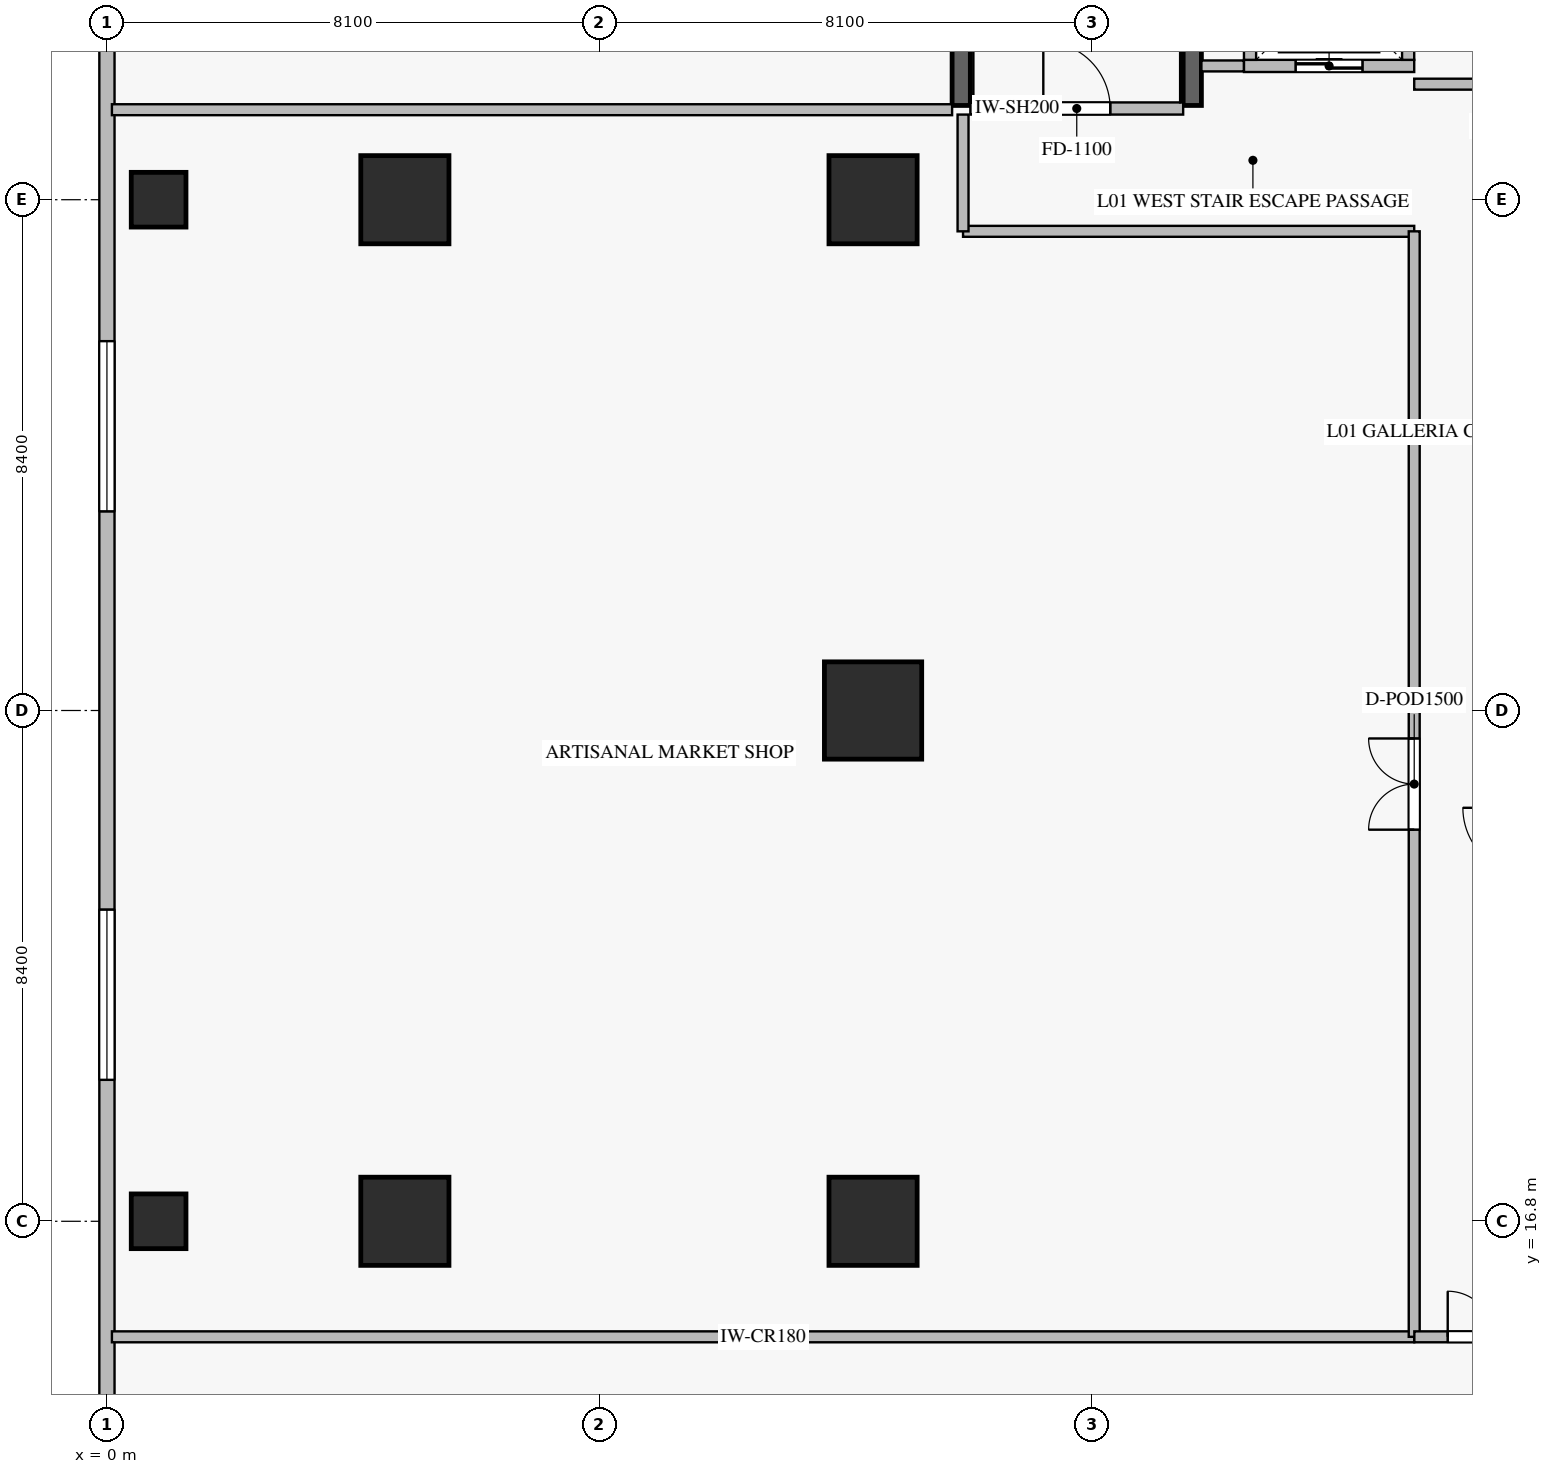
"""IFC4 building model, lengths in metres.
Left out: names, types, materials, properties, quantities, classifications, styles, units other than length and angle.
Written with IfcOpenShell. Run it as: python <this file> out.ifc"""

import sys

from ifc_helpers import new_model, si_unit, direction, frame, frame_2d, origin, origin_2d, place, context, subcontext, project, spatial, rectangle, extrude, source, transform, mapped, element, fill, save


model = new_model("IFC4")
c1 = context("Model", 3, precision=1e-05, world=origin(), true_north=direction((0.0, 1.0)))
c2 = subcontext(c1, "Body", "Model", "MODEL_VIEW")
j1 = project(units=[si_unit("LENGTHUNIT", "METRE"), si_unit("PLANEANGLEUNIT", "RADIAN")], contexts=[c1])
p1 = place(None, origin())
s1 = spatial("IfcSite", under=j1, at=p1, CompositionType="ELEMENT")
p2 = place(p1, origin())
s2 = spatial("IfcBuilding", under=s1, at=p2, CompositionType="ELEMENT")
p3 = place(p2, frame((0.0, 0.0, 5.5)))
s3 = spatial("IfcBuildingStorey", under=s2, at=p3, CompositionType="ELEMENT", Elevation=5.5)
m1 = source(origin(), c2, "Body", "SweptSolid", [
    extrude(rectangle(XDim=0.9, YDim=0.9, at=origin_2d()), origin(), (0.0, 0.0, 1.0), 5.0),
])
for number, where, z_axis, x_axis in (
    (1, (0.85, 16.8, -0.38), (0.0, 0.0, 1.0), (1.0, 0.0, 0.0)),
    (2, (0.85, 33.6, -0.38), (0.0, 0.0, 1.0), (1.0, 0.0, 0.0)),
):
    element("IfcColumn", number, at=place(p3, frame(where, z_axis=z_axis, x_axis=x_axis)), inside=s3, PredefinedType="COLUMN", context=c2, shape_type="MappedRepresentation", body=[
        mapped(m1, transform((0.0, 0.0, 0.0), scale=1.0)),
    ])
m2 = source(origin(), c2, "Body", "SweptSolid", [
    extrude(rectangle(XDim=1.45, YDim=1.45, at=origin_2d()), origin(), (0.0, 0.0, 1.0), 5.0),
])
p4 = place(p3, frame((12.6, 16.8, -0.38), z_axis=(0.0, 0.0, 1.0), x_axis=(1.0, 0.0, 0.0)))
e3 = element("IfcColumn", 3, at=p4, inside=s3, PredefinedType="COLUMN", context=c2, shape_type="MappedRepresentation", body=[
    mapped(m2, transform((0.0, 0.0, 0.0), scale=1.0)),
])
m3 = source(origin(), c2, "Body", "SweptSolid", [
    extrude(rectangle(XDim=1.6, YDim=1.6, at=origin_2d()), origin(), (0.0, 0.0, 1.0), 5.0),
])
p5 = place(p3, frame((12.6, 25.2, -0.38), z_axis=(0.0, 0.0, 1.0), x_axis=(1.0, 0.0, 0.0)))
e4 = element("IfcColumn", 4, at=p5, inside=s3, PredefinedType="COLUMN", context=c2, shape_type="MappedRepresentation", body=[
    mapped(m3, transform((0.0, 0.0, 0.0), scale=1.0)),
])
for number, where, z_axis, x_axis in (
    (5, (12.6, 33.6, -0.38), (0.0, 0.0, 1.0), (1.0, 0.0, 0.0)),
    (6, (4.9, 16.8, -0.38), (0.0, 0.0, 1.0), (1.0, 0.0, 0.0)),
    (7, (4.9, 33.6, -0.38), (0.0, 0.0, 1.0), (1.0, 0.0, 0.0)),
):
    element("IfcColumn", number, at=place(p3, frame(where, z_axis=z_axis, x_axis=x_axis)), inside=s3, PredefinedType="COLUMN", context=c2, shape_type="MappedRepresentation", body=[
        mapped(m2, transform((0.0, 0.0, 0.0), scale=1.0)),
    ])
p6 = place(p3, frame((0.0, 46.075, 0.0), z_axis=(0.0, 0.0, 1.0), x_axis=(0.0, -1.0, 0.0)))
e8 = element("IfcWall", 8, at=p6, inside=s3, PredefinedType="ELEMENTEDWALL", context=c2, shape_type="SweptSolid", body=[
    extrude(rectangle(XDim=41.75, YDim=0.25, at=frame_2d((20.875, 0.0))), origin(), (0.0, 0.0, 1.0), 4.605),
])
p7 = place(p6, frame((14.801, 0.0, 0.6)))
e9 = element("IfcOpeningElement", 9, at=p7, cuts=e8, PredefinedType="OPENING", context=c2, shape_type="SweptSolid", body=[
    extrude(rectangle(XDim=2.8, YDim=3.0, at=frame_2d((1.4, 1.5))), frame((0.0, 0.135, 0.0), z_axis=(0.0, -1.0, 0.0), x_axis=(1.0, 0.0, 0.0)), (0.0, 0.0, 1.0), 0.27),
])
p8 = place(p6, frame((24.149, 0.0, 0.6)))
e10 = element("IfcOpeningElement", 10, at=p8, cuts=e8, PredefinedType="OPENING", context=c2, shape_type="SweptSolid", body=[
    extrude(rectangle(XDim=2.8, YDim=3.0, at=frame_2d((1.4, 1.5))), frame((0.0, 0.135, 0.0), z_axis=(0.0, -1.0, 0.0), x_axis=(1.0, 0.0, 0.0)), (0.0, 0.0, 1.0), 0.27),
])
for number, where, z_axis, x_axis in (
    (11, (14.05, 35.15, -0.38), (0.0, 0.0, 1.0), (0.0, 1.0, 0.0)),
    (12, (17.85, 35.15, -0.38), (0.0, 0.0, 1.0), (0.0, 1.0, 0.0)),
):
    element("IfcWall", number, at=place(p3, frame(where, z_axis=z_axis, x_axis=x_axis)), inside=s3, PredefinedType="SHEAR", context=c2, shape_type="SweptSolid", body=[
        extrude(rectangle(XDim=7.9, YDim=0.3, at=frame_2d((3.95, 0.0))), origin(), (0.0, 0.0, 1.0), 4.998),
    ])
p9 = place(p3, frame((14.2, 35.1, 0.0), z_axis=(0.0, 0.0, 1.0), x_axis=(1.0, 0.0, 0.0)))
e13 = element("IfcWall", 13, at=p9, inside=s3, PredefinedType="STANDARD", context=c2, shape_type="SweptSolid", body=[
    extrude(rectangle(XDim=3.5, YDim=0.2, at=frame_2d((1.75, 0.0))), origin(), (0.0, 0.0, 1.0), 4.62),
])
p10 = place(p9, frame((1.2, 0.0, 0.0)))
e14 = element("IfcOpeningElement", 14, at=p10, cuts=e13, PredefinedType="OPENING", context=c2, shape_type="SweptSolid", body=[
    extrude(rectangle(XDim=1.1, YDim=2.15, at=frame_2d((0.55, 1.075))), frame((0.0, 0.11, 0.0), z_axis=(0.0, -1.0, 0.0), x_axis=(1.0, 0.0, 0.0)), (0.0, 0.0, 1.0), 0.22),
])
p11 = place(p3, frame((18.7, 35.8, 0.0), z_axis=(0.0, 0.0, 1.0), x_axis=(1.0, 0.0, 0.0)))
e15 = element("IfcWall", 15, at=p11, inside=s3, PredefinedType="STANDARD", context=c2, shape_type="SweptSolid", body=[
    extrude(rectangle(XDim=2.8, YDim=0.2, at=frame_2d((1.4, 0.0))), origin(), (0.0, 0.0, 1.0), 4.62),
])
p12 = place(p11, frame((0.85, 0.0, 0.0)))
e16 = element("IfcOpeningElement", 16, at=p12, cuts=e15, PredefinedType="OPENING", context=c2, shape_type="SweptSolid", body=[
    extrude(rectangle(XDim=1.1, YDim=2.2, at=frame_2d((0.55, 1.1))), frame((0.0, 0.11, 0.0), z_axis=(0.0, -1.0, 0.0), x_axis=(1.0, 0.0, 0.0)), (0.0, 0.0, 1.0), 0.22),
])
for number, where, z_axis, x_axis in (
    (17, (18.8, 35.9, 0.0), (0.0, 0.0, 1.0), (0.0, 1.0, 0.0)),
    (18, (21.4, 35.9, 0.0), (0.0, 0.0, 1.0), (0.0, 1.0, 0.0)),
):
    element("IfcWall", number, at=place(p3, frame(where, z_axis=z_axis, x_axis=x_axis)), inside=s3, PredefinedType="STANDARD", context=c2, shape_type="SweptSolid", body=[
        extrude(rectangle(XDim=2.4, YDim=0.2, at=frame_2d((1.2, 0.0))), origin(), (0.0, 0.0, 1.0), 4.62),
    ])
p13 = place(p3, frame((0.082, 14.9, 0.0), z_axis=(0.0, 0.0, 1.0), x_axis=(1.0, 0.0, 0.0)))
e19 = element("IfcWall", 19, at=p13, inside=s3, PredefinedType="PARTITIONING", context=c2, shape_type="SweptSolid", body=[
    extrude(rectangle(XDim=21.418, YDim=0.18, at=frame_2d((10.709, 0.0))), origin(), (0.0, 0.0, 1.0), 4.62),
])
p14 = place(p3, frame((0.082, 35.08, 0.0), z_axis=(0.0, 0.0, 1.0), x_axis=(1.0, 0.0, 0.0)))
e20 = element("IfcWall", 20, at=p14, inside=s3, PredefinedType="PARTITIONING", context=c2, shape_type="SweptSolid", body=[
    extrude(rectangle(XDim=13.818, YDim=0.18, at=frame_2d((6.909, 0.0))), origin(), (0.0, 0.0, 1.0), 4.62),
])
p15 = place(p3, frame((14.08, 33.08, 0.0), z_axis=(0.0, 0.0, 1.0), x_axis=(1.0, 0.0, 0.0)))
e21 = element("IfcWall", 21, at=p15, inside=s3, PredefinedType="PARTITIONING", context=c2, shape_type="SweptSolid", body=[
    extrude(rectangle(XDim=7.42, YDim=0.18, at=frame_2d((3.71, 0.0))), origin(), (0.0, 0.0, 1.0), 4.62),
])
p16 = place(p3, frame((18.0, 35.8, 0.0), z_axis=(0.0, 0.0, 1.0), x_axis=(1.0, 0.0, 0.0)))
e22 = element("IfcWall", 22, at=p16, inside=s3, PredefinedType="PARTITIONING", context=c2, shape_type="SweptSolid", body=[
    extrude(rectangle(XDim=0.698, YDim=0.18, at=frame_2d((0.349, 0.0))), origin(), (0.0, 0.0, 1.0), 4.62),
])
p17 = place(p3, frame((14.08, 33.08, 0.0), z_axis=(0.0, 0.0, 1.0), x_axis=(0.0, 1.0, 0.0)))
e23 = element("IfcWall", 23, at=p17, inside=s3, PredefinedType="PARTITIONING", context=c2, shape_type="SweptSolid", body=[
    extrude(rectangle(XDim=1.92, YDim=0.18, at=frame_2d((0.96, 0.0))), origin(), (0.0, 0.0, 1.0), 4.62),
])
p18 = place(p3, frame((21.5, 14.9, 0.0), z_axis=(0.0, 0.0, 1.0), x_axis=(0.0, 1.0, 0.0)))
e24 = element("IfcWall", 24, at=p18, inside=s3, PredefinedType="PARTITIONING", context=c2, shape_type="SweptSolid", body=[
    extrude(rectangle(XDim=18.18, YDim=0.18, at=frame_2d((9.09, 0.0))), origin(), (0.0, 0.0, 1.0), 4.62),
])
p19 = place(p18, frame((8.34, 0.0, 0.0)))
e25 = element("IfcOpeningElement", 25, at=p19, cuts=e24, PredefinedType="OPENING", context=c2, shape_type="SweptSolid", body=[
    extrude(rectangle(XDim=1.5, YDim=2.25, at=frame_2d((0.75, 1.125))), frame((0.0, 0.1, 0.0), z_axis=(0.0, -1.0, 0.0), x_axis=(1.0, 0.0, 0.0)), (0.0, 0.0, 1.0), 0.2),
])
p20 = place(p3, frame((21.502, 14.9, 0.0), z_axis=(0.0, 0.0, 1.0), x_axis=(1.0, 0.0, 0.0)))
e26 = element("IfcWall", 26, at=p20, inside=s3, PredefinedType="PARTITIONING", context=c2, shape_type="SweptSolid", body=[
    extrude(rectangle(XDim=2.598, YDim=0.18, at=frame_2d((1.299, 0.0))), origin(), (0.0, 0.0, 1.0), 4.62),
])
p21 = place(p20, frame((0.549, 0.0, 0.0)))
e27 = element("IfcOpeningElement", 27, at=p21, cuts=e26, PredefinedType="OPENING", context=c2, shape_type="SweptSolid", body=[
    extrude(rectangle(XDim=1.5, YDim=2.25, at=frame_2d((0.75, 1.125))), frame((0.0, 0.1, 0.0), z_axis=(0.0, -1.0, 0.0), x_axis=(1.0, 0.0, 0.0)), (0.0, 0.0, 1.0), 0.2),
])
p22 = place(p3, frame((21.5, 35.5, 0.0), z_axis=(0.0, 0.0, 1.0), x_axis=(1.0, 0.0, 0.0)))
e28 = element("IfcWall", 28, at=p22, inside=s3, PredefinedType="PARTITIONING", context=c2, shape_type="SweptSolid", body=[
    extrude(rectangle(XDim=3.5, YDim=0.18, at=frame_2d((1.75, 0.0))), origin(), (0.0, 0.0, 1.0), 4.62),
])
p23 = place(p22, frame((1.05, 0.0, 0.0)))
e29 = element("IfcOpeningElement", 29, at=p23, cuts=e28, PredefinedType="OPENING", context=c2, shape_type="SweptSolid", body=[
    extrude(rectangle(XDim=1.4, YDim=2.25, at=frame_2d((0.7, 1.125))), frame((0.0, 0.1, 0.0), z_axis=(0.0, -1.0, 0.0), x_axis=(1.0, 0.0, 0.0)), (0.0, 0.0, 1.0), 0.2),
])
m4 = source(origin(), c2, "Body", "SweptSolid", [
    extrude(rectangle(XDim=2.8, YDim=3.0, at=frame_2d((1.4, 1.5))), frame((0.0, 0.03, 0.0), z_axis=(0.0, -1.0, 0.0), x_axis=(1.0, 0.0, 0.0)), (0.0, 0.0, 1.0), 0.06),
])
p24 = place(p7, origin())
e30 = element("IfcWindow", 30, at=p24, inside=s3, PartitioningType="SINGLE_PANEL", PredefinedType="WINDOW", context=c2, shape_type="MappedRepresentation", body=[
    mapped(m4, transform((0.0, 0.0, 0.0), scale=1.0)),
])
fill(e9, e30)
p25 = place(p8, origin())
e31 = element("IfcWindow", 31, at=p25, inside=s3, PartitioningType="SINGLE_PANEL", PredefinedType="WINDOW", context=c2, shape_type="MappedRepresentation", body=[
    mapped(m4, transform((0.0, 0.0, 0.0), scale=1.0)),
])
fill(e10, e31)
m5 = source(origin(), c2, "Body", "SweptSolid", [
    extrude(rectangle(XDim=1.1, YDim=2.15, at=frame_2d((0.55, 1.075))), frame((0.0, 0.025, 0.0), z_axis=(0.0, -1.0, 0.0), x_axis=(1.0, 0.0, 0.0)), (0.0, 0.0, 1.0), 0.05),
])
p26 = place(p10, origin())
e32 = element("IfcDoor", 32, at=p26, inside=s3, OperationType="SINGLE_SWING_LEFT", PredefinedType="DOOR", context=c2, shape_type="MappedRepresentation", body=[
    mapped(m5, transform((0.0, 0.0, 0.0), scale=1.0)),
])
fill(e14, e32)
m6 = source(origin(), c2, "Body", "SweptSolid", [
    extrude(rectangle(XDim=1.1, YDim=2.2, at=frame_2d((0.55, 1.1))), frame((0.0, 0.025, 0.0), z_axis=(0.0, -1.0, 0.0), x_axis=(1.0, 0.0, 0.0)), (0.0, 0.0, 1.0), 0.05),
])
p27 = place(p12, origin())
e33 = element("IfcDoor", 33, at=p27, inside=s3, OperationType="DOUBLE_DOOR_SLIDING", PredefinedType="DOOR", context=c2, shape_type="MappedRepresentation", body=[
    mapped(m6, transform((0.0, 0.0, 0.0), scale=1.0)),
])
fill(e16, e33)
m7 = source(origin(), c2, "Body", "SweptSolid", [
    extrude(rectangle(XDim=1.5, YDim=2.25, at=frame_2d((0.75, 1.125))), frame((0.0, 0.025, 0.0), z_axis=(0.0, -1.0, 0.0), x_axis=(1.0, 0.0, 0.0)), (0.0, 0.0, 1.0), 0.05),
])
p28 = place(p19, origin())
e34 = element("IfcDoor", 34, at=p28, inside=s3, OperationType="DOUBLE_DOOR_SINGLE_SWING", PredefinedType="DOOR", context=c2, shape_type="MappedRepresentation", body=[
    mapped(m7, transform((0.0, 0.0, 0.0), scale=1.0)),
])
fill(e25, e34)
p29 = place(p21, origin())
e35 = element("IfcDoor", 35, at=p29, inside=s3, OperationType="DOUBLE_DOOR_SINGLE_SWING", PredefinedType="DOOR", context=c2, shape_type="MappedRepresentation", body=[
    mapped(m7, transform((0.0, 0.0, 0.0), scale=1.0)),
])
fill(e27, e35)
save(model, sys.argv[1])
